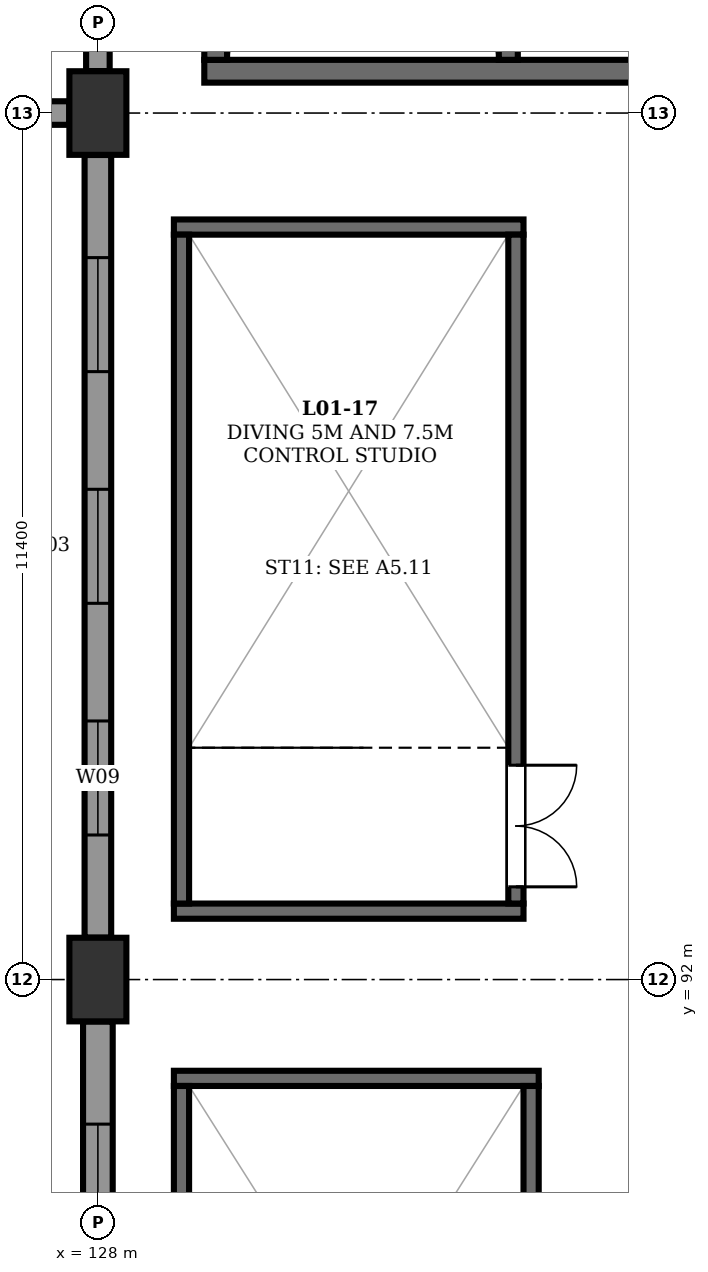
"""IFC4 building model, lengths in metres.
Left out: names, types, materials, properties, quantities, classifications, styles, units other than length and angle.
Written with IfcOpenShell. Run it as: python <this file> out.ifc"""

import sys

from ifc_helpers import new_model, si_unit, direction, frame, frame_2d, origin, origin_2d, place, context, subcontext, project, spatial, rectangle, extrude, element, fill, save


model = new_model("IFC4")
c1 = context("Model", 3, precision=1e-05, world=origin(), true_north=direction((0.0, 1.0)))
c2 = subcontext(c1, "Body", "Model", "MODEL_VIEW")
j1 = project(units=[si_unit("LENGTHUNIT", "METRE"), si_unit("PLANEANGLEUNIT", "RADIAN")], contexts=[c1])
p1 = place(None, origin())
s1 = spatial("IfcSite", under=j1, at=p1, CompositionType="ELEMENT")
p2 = place(p1, origin())
s2 = spatial("IfcBuilding", under=s1, at=p2, CompositionType="ELEMENT")
p3 = place(p2, frame((0.0, 0.0, 5.4)))
s3 = spatial("IfcBuildingStorey", under=s2, at=p3, CompositionType="ELEMENT", Elevation=5.4)
for number, where, z_axis, x_axis in (
    (1, (128.0, 92.0, 0.0), (0.0, 0.0, 1.0), (1.0, 0.0, 0.0)),
    (2, (128.0, 103.4, 0.0), (0.0, 0.0, 1.0), (1.0, 0.0, 0.0)),
):
    element("IfcColumn", number, at=place(p3, frame(where, z_axis=z_axis, x_axis=x_axis)), inside=s3, PredefinedType="COLUMN", context=c2, shape_type="SweptSolid", body=[
        extrude(rectangle(XDim=0.75, YDim=1.1, at=origin_2d()), origin(), (0.0, 0.0, 1.0), 4.8),
    ])
p4 = place(p3, frame((119.377, 103.4, 0.0), z_axis=(0.0, 0.0, 1.0), x_axis=(1.0, 0.0, 0.0)))
e3 = element("IfcWall", 3, at=p4, inside=s3, PredefinedType="STANDARD", context=c2, shape_type="SweptSolid", body=[
    extrude(rectangle(XDim=8.246, YDim=0.31, at=frame_2d((4.123, 0.0))), origin(), (0.0, 0.0, 1.0), 3.645),
])
p5 = place(p4, frame((1.35, 0.0, 0.75)))
e4 = element("IfcOpeningElement", 4, at=p5, cuts=e3, PredefinedType="OPENING", context=c2, shape_type="SweptSolid", body=[
    extrude(rectangle(XDim=2.05, YDim=1.75, at=frame_2d((1.025, 0.875))), frame((0.0, 0.167, 0.0), z_axis=(0.0, -1.0, 0.0), x_axis=(1.0, 0.0, 0.0)), (0.0, 0.0, 1.0), 0.334),
])
p6 = place(p4, frame((4.846, 0.0, 0.75)))
e5 = element("IfcOpeningElement", 5, at=p6, cuts=e3, PredefinedType="OPENING", context=c2, shape_type="SweptSolid", body=[
    extrude(rectangle(XDim=2.05, YDim=1.75, at=frame_2d((1.025, 0.875))), frame((0.0, 0.167, 0.0), z_axis=(0.0, -1.0, 0.0), x_axis=(1.0, 0.0, 0.0)), (0.0, 0.0, 1.0), 0.334),
])
p7 = place(p3, frame((128.0, 81.152, 0.0), z_axis=(0.0, 0.0, 1.0), x_axis=(0.0, 1.0, 0.0)))
e6 = element("IfcWall", 6, at=p7, inside=s3, PredefinedType="STANDARD", context=c2, shape_type="SweptSolid", body=[
    extrude(rectangle(XDim=10.296, YDim=0.39, at=frame_2d((5.148, 0.0))), origin(), (0.0, 0.0, 1.0), 4.012),
])
p8 = place(p7, frame((1.35, 0.0, 0.75)))
e7 = element("IfcOpeningElement", 7, at=p8, cuts=e6, PredefinedType="OPENING", context=c2, shape_type="SweptSolid", body=[
    extrude(rectangle(XDim=2.05, YDim=1.75, at=frame_2d((1.025, 0.875))), frame((0.0, 0.207, 0.0), z_axis=(0.0, -1.0, 0.0), x_axis=(1.0, 0.0, 0.0)), (0.0, 0.0, 1.0), 0.414),
])
p9 = place(p7, frame((4.123, 0.0, 0.75)))
e8 = element("IfcOpeningElement", 8, at=p9, cuts=e6, PredefinedType="OPENING", context=c2, shape_type="SweptSolid", body=[
    extrude(rectangle(XDim=2.05, YDim=1.75, at=frame_2d((1.025, 0.875))), frame((0.0, 0.207, 0.0), z_axis=(0.0, -1.0, 0.0), x_axis=(1.0, 0.0, 0.0)), (0.0, 0.0, 1.0), 0.414),
])
p10 = place(p7, frame((6.896, 0.0, 0.75)))
e9 = element("IfcOpeningElement", 9, at=p10, cuts=e6, PredefinedType="OPENING", context=c2, shape_type="SweptSolid", body=[
    extrude(rectangle(XDim=2.05, YDim=1.75, at=frame_2d((1.025, 0.875))), frame((0.0, 0.207, 0.0), z_axis=(0.0, -1.0, 0.0), x_axis=(1.0, 0.0, 0.0)), (0.0, 0.0, 1.0), 0.414),
])
p11 = place(p3, frame((128.0, 92.552, 0.0), z_axis=(0.0, 0.0, 1.0), x_axis=(0.0, 1.0, 0.0)))
e10 = element("IfcWall", 10, at=p11, inside=s3, PredefinedType="STANDARD", context=c2, shape_type="SweptSolid", body=[
    extrude(rectangle(XDim=10.296, YDim=0.35, at=frame_2d((5.148, 0.0))), origin(), (0.0, 0.0, 1.0), 4.012),
])
p12 = place(p11, frame((1.35, 0.0, 0.75)))
e11 = element("IfcOpeningElement", 11, at=p12, cuts=e10, PredefinedType="OPENING", context=c2, shape_type="SweptSolid", body=[
    extrude(rectangle(XDim=1.5, YDim=2.05, at=frame_2d((0.75, 1.025))), frame((0.0, 0.187, 0.0), z_axis=(0.0, -1.0, 0.0), x_axis=(1.0, 0.0, 0.0)), (0.0, 0.0, 1.0), 0.374),
])
p13 = place(p11, frame((4.398, 0.0, 0.75)))
e12 = element("IfcOpeningElement", 12, at=p13, cuts=e10, PredefinedType="OPENING", context=c2, shape_type="SweptSolid", body=[
    extrude(rectangle(XDim=1.5, YDim=2.05, at=frame_2d((0.75, 1.025))), frame((0.0, 0.187, 0.0), z_axis=(0.0, -1.0, 0.0), x_axis=(1.0, 0.0, 0.0)), (0.0, 0.0, 1.0), 0.374),
])
p14 = place(p11, frame((7.446, 0.0, 0.75)))
e13 = element("IfcOpeningElement", 13, at=p14, cuts=e10, PredefinedType="OPENING", context=c2, shape_type="SweptSolid", body=[
    extrude(rectangle(XDim=1.5, YDim=2.05, at=frame_2d((0.75, 1.025))), frame((0.0, 0.187, 0.0), z_axis=(0.0, -1.0, 0.0), x_axis=(1.0, 0.0, 0.0)), (0.0, 0.0, 1.0), 0.374),
])
p15 = place(p3, frame((128.0, 103.952, 0.0), z_axis=(0.0, 0.0, 1.0), x_axis=(0.0, 1.0, 0.0)))
e14 = element("IfcWall", 14, at=p15, inside=s3, PredefinedType="STANDARD", context=c2, shape_type="SweptSolid", body=[
    extrude(rectangle(XDim=9.648, YDim=0.31, at=frame_2d((4.824, 0.0))), origin(), (0.0, 0.0, 1.0), 4.012),
])
p16 = place(p15, frame((1.35, 0.0, 0.75)))
e15 = element("IfcOpeningElement", 15, at=p16, cuts=e14, PredefinedType="OPENING", context=c2, shape_type="SweptSolid", body=[
    extrude(rectangle(XDim=1.1, YDim=1.25, at=frame_2d((0.55, 0.625))), frame((0.0, 0.167, 0.0), z_axis=(0.0, -1.0, 0.0), x_axis=(1.0, 0.0, 0.0)), (0.0, 0.0, 1.0), 0.334),
])
p17 = place(p15, frame((4.274, 0.0, 0.75)))
e16 = element("IfcOpeningElement", 16, at=p17, cuts=e14, PredefinedType="OPENING", context=c2, shape_type="SweptSolid", body=[
    extrude(rectangle(XDim=1.1, YDim=1.25, at=frame_2d((0.55, 0.625))), frame((0.0, 0.167, 0.0), z_axis=(0.0, -1.0, 0.0), x_axis=(1.0, 0.0, 0.0)), (0.0, 0.0, 1.0), 0.334),
])
p18 = place(p15, frame((7.198, 0.0, 0.75)))
e17 = element("IfcOpeningElement", 17, at=p18, cuts=e14, PredefinedType="OPENING", context=c2, shape_type="SweptSolid", body=[
    extrude(rectangle(XDim=1.1, YDim=1.25, at=frame_2d((0.55, 0.625))), frame((0.0, 0.167, 0.0), z_axis=(0.0, -1.0, 0.0), x_axis=(1.0, 0.0, 0.0)), (0.0, 0.0, 1.0), 0.334),
])
p19 = place(p3, frame((129.4, 103.95, 0.0), z_axis=(0.0, 0.0, 1.0), x_axis=(1.0, 0.0, 0.0)))
e18 = element("IfcWall", 18, at=p19, inside=s3, PredefinedType="SHEAR", context=c2, shape_type="SweptSolid", body=[
    extrude(rectangle(XDim=8.0, YDim=0.3, at=frame_2d((4.0, 0.0))), origin(), (0.0, 0.0, 1.0), 4.56),
])
p20 = place(p3, frame((129.55, 104.1, 0.0), z_axis=(0.0, 0.0, 1.0), x_axis=(0.0, 1.0, 0.0)))
e19 = element("IfcWall", 19, at=p20, inside=s3, PredefinedType="SHEAR", context=c2, shape_type="SweptSolid", body=[
    extrude(rectangle(XDim=9.6, YDim=0.3, at=frame_2d((4.8, 0.0))), origin(), (0.0, 0.0, 1.0), 4.56),
])
p21 = place(p20, frame((1.2, 0.0, 0.0)))
e20 = element("IfcOpeningElement", 20, at=p21, cuts=e19, PredefinedType="OPENING", context=c2, shape_type="SweptSolid", body=[
    extrude(rectangle(XDim=1.3, YDim=2.2, at=frame_2d((0.65, 1.1))), frame((0.0, 0.162, 0.0), z_axis=(0.0, -1.0, 0.0), x_axis=(1.0, 0.0, 0.0)), (0.0, 0.0, 1.0), 0.324),
])
p22 = place(p20, frame((5.4, 0.0, 0.0)))
e21 = element("IfcOpeningElement", 21, at=p22, cuts=e19, PredefinedType="OPENING", context=c2, shape_type="SweptSolid", body=[
    extrude(rectangle(XDim=1.1, YDim=2.2, at=frame_2d((0.55, 1.1))), frame((0.0, 0.162, 0.0), z_axis=(0.0, -1.0, 0.0), x_axis=(1.0, 0.0, 0.0)), (0.0, 0.0, 1.0), 0.324),
])
p23 = place(p3, frame((133.4, 104.1, 0.0), z_axis=(0.0, 0.0, 1.0), x_axis=(0.0, 1.0, 0.0)))
e22 = element("IfcWall", 22, at=p23, inside=s3, PredefinedType="SHEAR", context=c2, shape_type="SweptSolid", body=[
    extrude(rectangle(XDim=9.6, YDim=0.25, at=frame_2d((4.8, 0.0))), origin(), (0.0, 0.0, 1.0), 4.56),
])
for number, where, z_axis, x_axis in (
    (23, (129.0, 92.9, 0.0), (0.0, 0.0, 1.0), (1.0, 0.0, 0.0)),
    (24, (129.0, 101.9, 0.0), (0.0, 0.0, 1.0), (1.0, 0.0, 0.0)),
):
    element("IfcWall", number, at=place(p3, frame(where, z_axis=z_axis, x_axis=x_axis)), inside=s3, PredefinedType="SOLIDWALL", context=c2, shape_type="SweptSolid", body=[
        extrude(rectangle(XDim=4.6, YDim=0.2, at=frame_2d((2.3, 0.0))), origin(), (0.0, 0.0, 1.0), 4.56),
    ])
p24 = place(p3, frame((129.1, 93.0, 0.0), z_axis=(0.0, 0.0, 1.0), x_axis=(0.0, 1.0, 0.0)))
e25 = element("IfcWall", 25, at=p24, inside=s3, PredefinedType="SOLIDWALL", context=c2, shape_type="SweptSolid", body=[
    extrude(rectangle(XDim=8.8, YDim=0.2, at=frame_2d((4.4, 0.0))), origin(), (0.0, 0.0, 1.0), 4.56),
])
p25 = place(p3, frame((133.5, 93.0, 0.0), z_axis=(0.0, 0.0, 1.0), x_axis=(0.0, 1.0, 0.0)))
e26 = element("IfcWall", 26, at=p25, inside=s3, PredefinedType="SOLIDWALL", context=c2, shape_type="SweptSolid", body=[
    extrude(rectangle(XDim=8.8, YDim=0.2, at=frame_2d((4.4, 0.0))), origin(), (0.0, 0.0, 1.0), 4.56),
])
p26 = place(p25, frame((0.22, 0.0, 0.0)))
e27 = element("IfcOpeningElement", 27, at=p26, cuts=e26, PredefinedType="OPENING", context=c2, shape_type="SweptSolid", body=[
    extrude(rectangle(XDim=1.6, YDim=2.2, at=frame_2d((0.8, 1.1))), frame((0.0, 0.112, 0.0), z_axis=(0.0, -1.0, 0.0), x_axis=(1.0, 0.0, 0.0)), (0.0, 0.0, 1.0), 0.224),
])
p27 = place(p3, frame((129.0, 90.7, 0.0), z_axis=(0.0, 0.0, 1.0), x_axis=(1.0, 0.0, 0.0)))
e28 = element("IfcWall", 28, at=p27, inside=s3, PredefinedType="SOLIDWALL", context=c2, shape_type="SweptSolid", body=[
    extrude(rectangle(XDim=4.8, YDim=0.2, at=frame_2d((2.4, 0.0))), origin(), (0.0, 0.0, 1.0), 4.56),
])
p28 = place(p3, frame((129.1, 81.6, 0.0), z_axis=(0.0, 0.0, 1.0), x_axis=(0.0, 1.0, 0.0)))
e29 = element("IfcWall", 29, at=p28, inside=s3, PredefinedType="SOLIDWALL", context=c2, shape_type="SweptSolid", body=[
    extrude(rectangle(XDim=9.0, YDim=0.2, at=frame_2d((4.5, 0.0))), origin(), (0.0, 0.0, 1.0), 4.56),
])
p29 = place(p3, frame((133.7, 81.6, 0.0), z_axis=(0.0, 0.0, 1.0), x_axis=(0.0, 1.0, 0.0)))
e30 = element("IfcWall", 30, at=p29, inside=s3, PredefinedType="SOLIDWALL", context=c2, shape_type="SweptSolid", body=[
    extrude(rectangle(XDim=9.0, YDim=0.2, at=frame_2d((4.5, 0.0))), origin(), (0.0, 0.0, 1.0), 4.56),
])
p30 = place(p29, frame((0.22, 0.0, 0.0)))
e31 = element("IfcOpeningElement", 31, at=p30, cuts=e30, PredefinedType="OPENING", context=c2, shape_type="SweptSolid", body=[
    extrude(rectangle(XDim=1.6, YDim=2.2, at=frame_2d((0.8, 1.1))), frame((0.0, 0.112, 0.0), z_axis=(0.0, -1.0, 0.0), x_axis=(1.0, 0.0, 0.0)), (0.0, 0.0, 1.0), 0.224),
])
p31 = place(p10, origin())
e32 = element("IfcWindow", 32, at=p31, inside=s3, PartitioningType="TRIPLE_PANEL_VERTICAL", PredefinedType="WINDOW", context=c2, shape_type="SweptSolid", body=[
    extrude(rectangle(XDim=2.05, YDim=1.75, at=frame_2d((1.025, 0.875))), frame((0.0, 0.08, 0.0), z_axis=(0.0, -1.0, 0.0), x_axis=(1.0, 0.0, 0.0)), (0.0, 0.0, 1.0), 0.06),
])
fill(e9, e32)
p32 = place(p12, origin())
e33 = element("IfcWindow", 33, at=p32, inside=s3, PartitioningType="DOUBLE_PANEL_VERTICAL", PredefinedType="WINDOW", context=c2, shape_type="SweptSolid", body=[
    extrude(rectangle(XDim=1.5, YDim=2.05, at=frame_2d((0.75, 1.025))), frame((0.0, 0.08, 0.0), z_axis=(0.0, -1.0, 0.0), x_axis=(1.0, 0.0, 0.0)), (0.0, 0.0, 1.0), 0.06),
])
fill(e11, e33)
p33 = place(p13, origin())
e34 = element("IfcWindow", 34, at=p33, inside=s3, PartitioningType="DOUBLE_PANEL_VERTICAL", PredefinedType="WINDOW", context=c2, shape_type="SweptSolid", body=[
    extrude(rectangle(XDim=1.5, YDim=2.05, at=frame_2d((0.75, 1.025))), frame((0.0, 0.08, 0.0), z_axis=(0.0, -1.0, 0.0), x_axis=(1.0, 0.0, 0.0)), (0.0, 0.0, 1.0), 0.06),
])
fill(e12, e34)
p34 = place(p14, origin())
e35 = element("IfcWindow", 35, at=p34, inside=s3, PartitioningType="DOUBLE_PANEL_VERTICAL", PredefinedType="WINDOW", context=c2, shape_type="SweptSolid", body=[
    extrude(rectangle(XDim=1.5, YDim=2.05, at=frame_2d((0.75, 1.025))), frame((0.0, 0.08, 0.0), z_axis=(0.0, -1.0, 0.0), x_axis=(1.0, 0.0, 0.0)), (0.0, 0.0, 1.0), 0.06),
])
fill(e13, e35)
p35 = place(p26, frame((1.6, 0.0, 0.0), z_axis=(0.0, 0.0, 1.0), x_axis=(-1.0, 0.0, 0.0)))
e36 = element("IfcDoor", 36, at=p35, inside=s3, OperationType="DOUBLE_DOOR_SINGLE_SWING", PredefinedType="DOOR", context=c2, shape_type="SweptSolid", body=[
    extrude(rectangle(XDim=1.6, YDim=2.2, at=frame_2d((0.8, 1.1))), frame((0.0, 0.025, 0.0), z_axis=(0.0, -1.0, 0.0), x_axis=(1.0, 0.0, 0.0)), (0.0, 0.0, 1.0), 0.05),
])
fill(e27, e36)
save(model, sys.argv[1])
